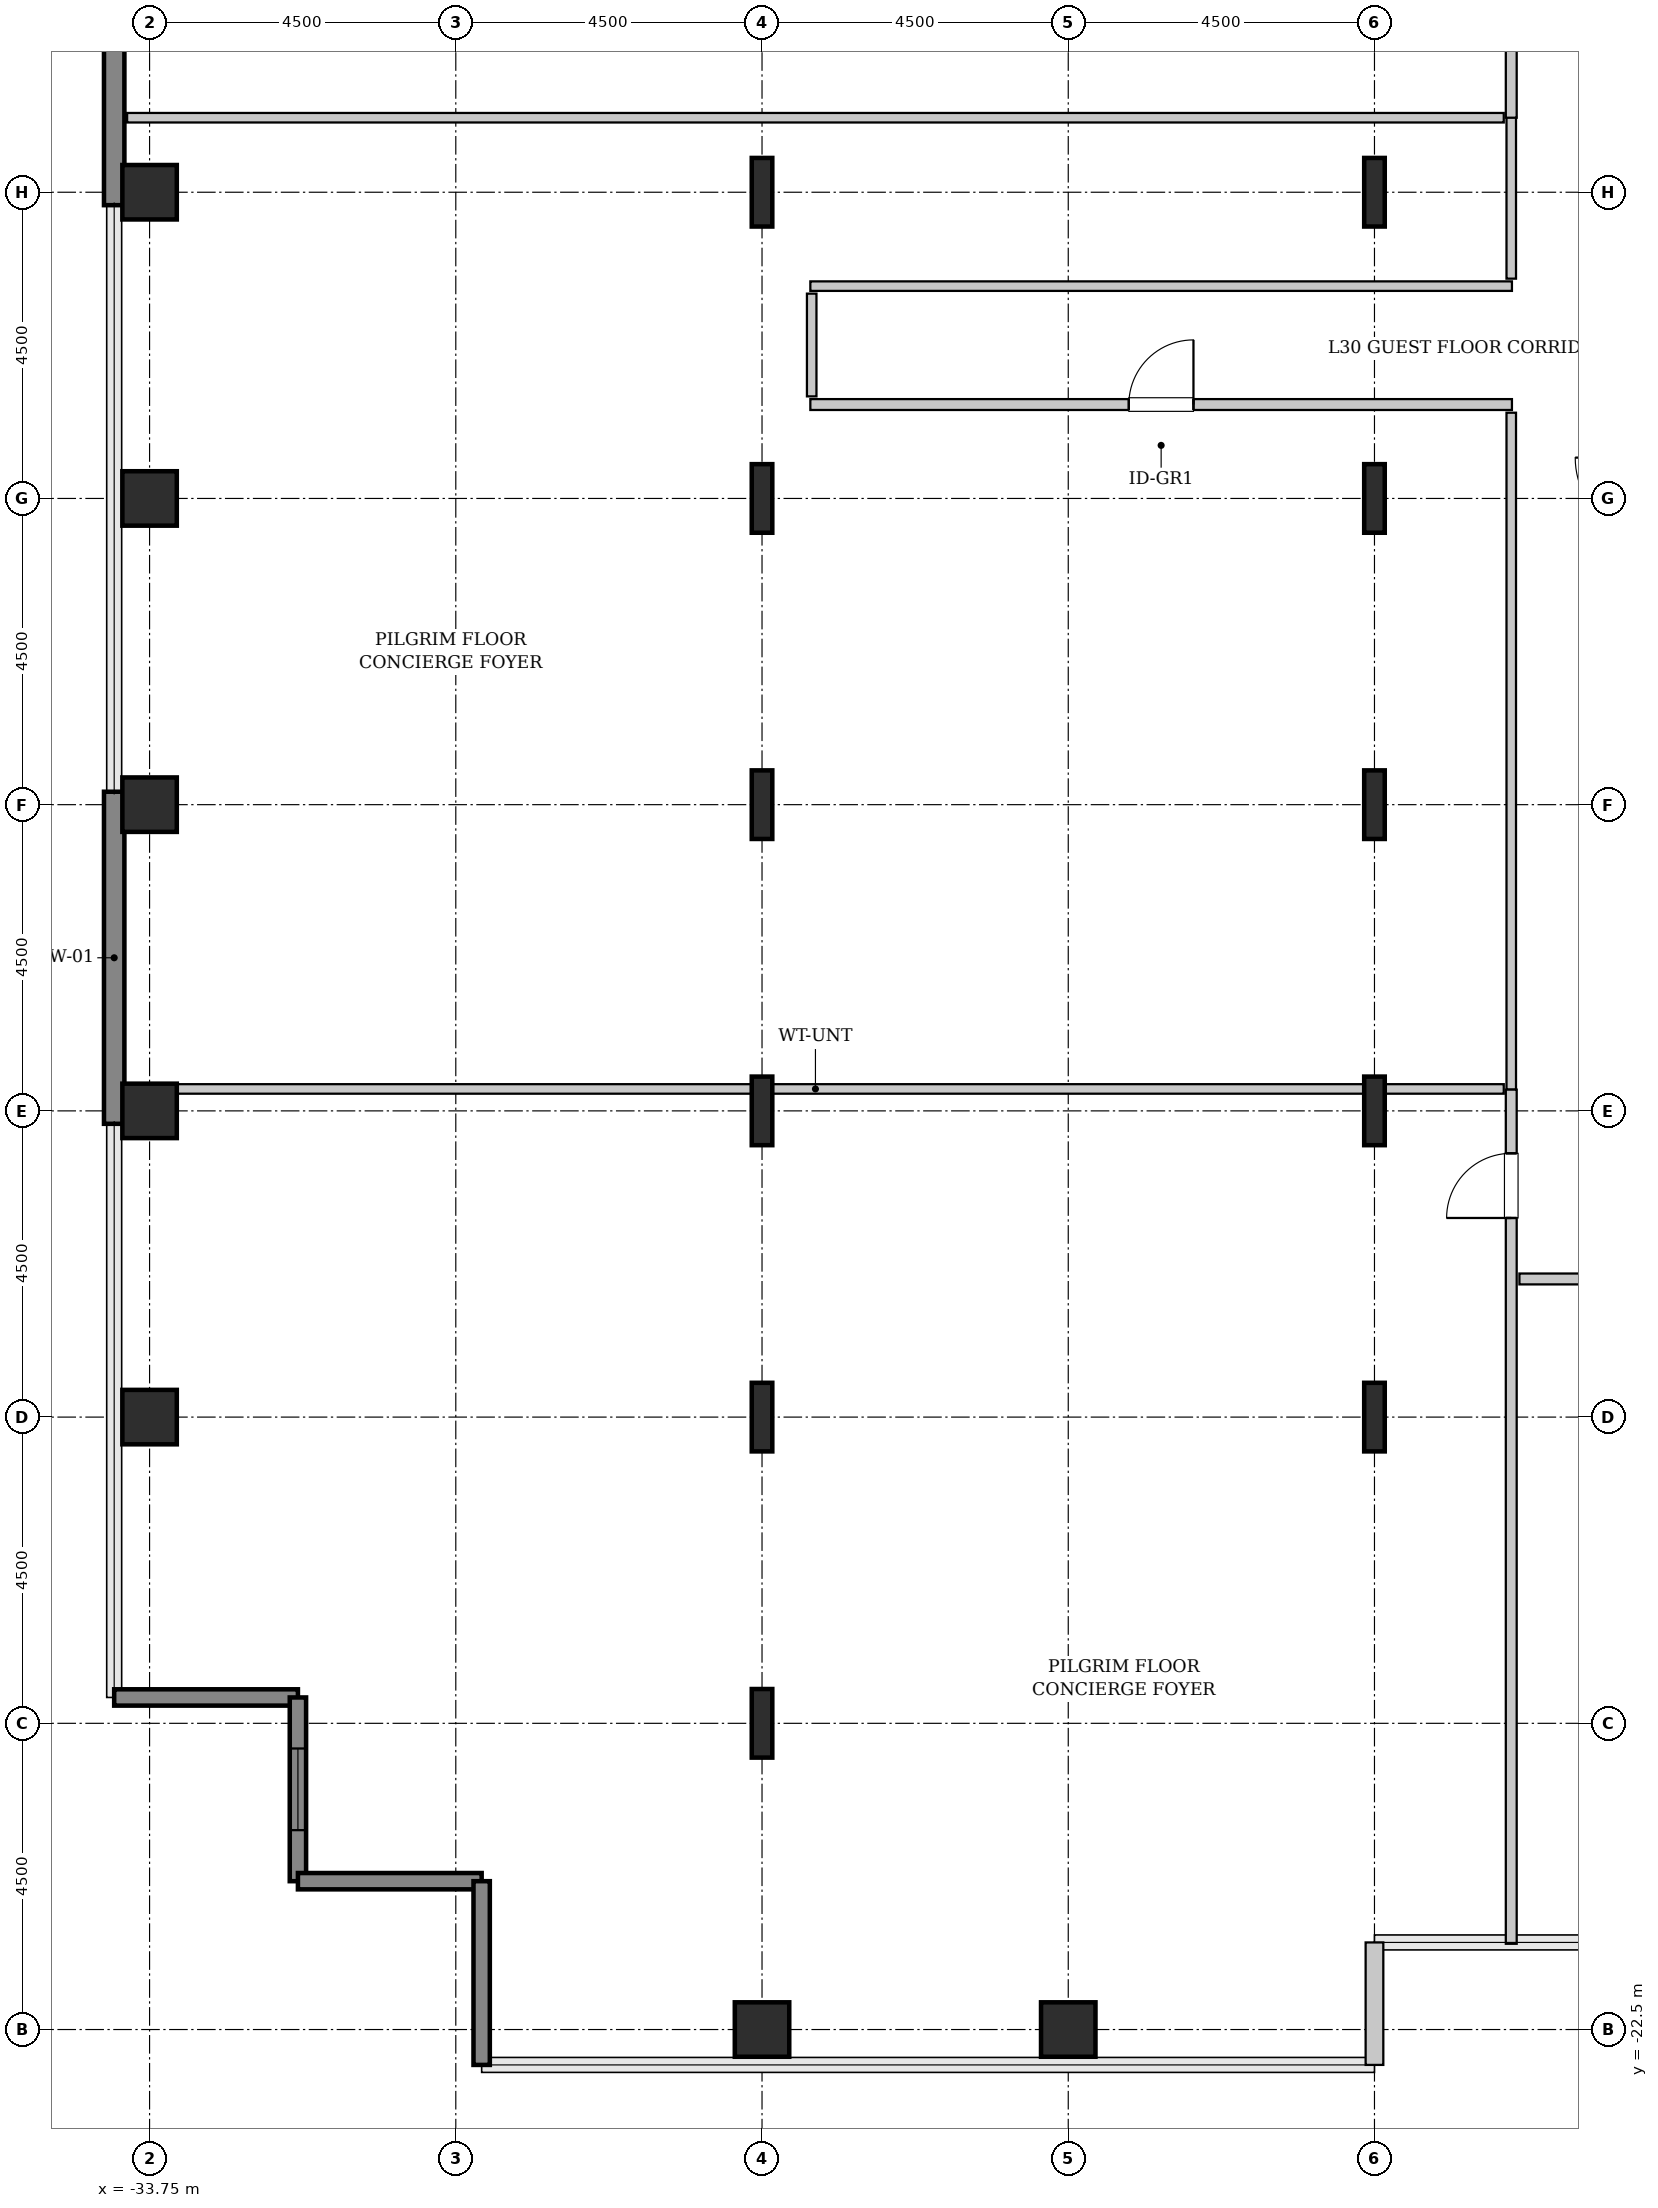
"""IFC4 building model, lengths in metres.
Left out: names, types, materials, properties, quantities, classifications, styles, units other than length and angle.
Written with IfcOpenShell. Run it as: python <this file> out.ifc"""

import sys

from ifc_helpers import new_model, si_unit, direction, frame, frame_2d, origin, origin_2d, place, context, subcontext, project, spatial, rectangle, hollow_rectangle, i_section, extrude, source, transform, mapped, element, fill, save


model = new_model("IFC4")
c1 = context("Model", 3, precision=1e-05, world=origin(), true_north=direction((0.0, 1.0)))
c2 = subcontext(c1, "Body", "Model", "MODEL_VIEW")
j1 = project(units=[si_unit("LENGTHUNIT", "METRE"), si_unit("PLANEANGLEUNIT", "RADIAN")], contexts=[c1])
p1 = place(None, origin())
s1 = spatial("IfcSite", under=j1, at=p1, CompositionType="ELEMENT")
p2 = place(p1, origin())
s2 = spatial("IfcBuilding", under=s1, at=p2, CompositionType="ELEMENT")
p3 = place(p2, frame((0.0, 0.0, 125.0)))
s3 = spatial("IfcBuildingStorey", under=s2, at=p3, CompositionType="ELEMENT", Elevation=125.0)
m1 = source(origin(), c2, "Body", "SweptSolid", [
    extrude(hollow_rectangle(XDim=0.8, YDim=0.8, WallThickness=0.04, InnerFilletRadius=0.04, OuterFilletRadius=0.08, at=origin_2d()), origin(), (0.0, 0.0, 1.0), 3.8),
])
for number, where, z_axis, x_axis in (
    (1, (-33.75, -13.5, 0.0), (0.0, 0.0, 1.0), (1.0, 0.0, 0.0)),
    (2, (-33.75, -9.0, 0.0), (0.0, 0.0, 1.0), (1.0, 0.0, 0.0)),
    (3, (-33.75, -4.5, 0.0), (0.0, 0.0, 1.0), (1.0, 0.0, 0.0)),
    (4, (-33.75, 0.0, 0.0), (0.0, 0.0, 1.0), (1.0, 0.0, 0.0)),
    (5, (-33.75, 4.5, 0.0), (0.0, 0.0, 1.0), (1.0, 0.0, 0.0)),
    (6, (-24.75, -22.5, 0.0), (0.0, 0.0, 1.0), (1.0, 0.0, 0.0)),
):
    element("IfcColumn", number, at=place(p3, frame(where, z_axis=z_axis, x_axis=x_axis)), inside=s3, PredefinedType="COLUMN", context=c2, shape_type="MappedRepresentation", body=[
        mapped(m1, transform((0.0, 0.0, 0.0), x_axis=(1.0, 0.0, 0.0), y_axis=(0.0, 1.0, 0.0), z_axis=(0.0, 0.0, 1.0), scale=1.0)),
    ])
m2 = source(origin(), c2, "Body", "SweptSolid", [
    extrude(i_section(OverallWidth=0.302, OverallDepth=1.008, WebThickness=0.021, FlangeThickness=0.04, FilletRadius=0.03, at=origin_2d()), origin(), (0.0, 0.0, 1.0), 3.8),
])
for number, where, z_axis, x_axis in (
    (7, (-24.75, -18.0, 0.0), (0.0, 0.0, 1.0), (1.0, 0.0, 0.0)),
    (8, (-24.75, -13.5, 0.0), (0.0, 0.0, 1.0), (1.0, 0.0, 0.0)),
    (9, (-24.75, -9.0, 0.0), (0.0, 0.0, 1.0), (1.0, 0.0, 0.0)),
    (10, (-24.75, -4.5, 0.0), (0.0, 0.0, 1.0), (1.0, 0.0, 0.0)),
    (11, (-24.75, 0.0, 0.0), (0.0, 0.0, 1.0), (1.0, 0.0, 0.0)),
    (12, (-24.75, 4.5, 0.0), (0.0, 0.0, 1.0), (1.0, 0.0, 0.0)),
):
    element("IfcColumn", number, at=place(p3, frame(where, z_axis=z_axis, x_axis=x_axis)), inside=s3, PredefinedType="COLUMN", context=c2, shape_type="MappedRepresentation", body=[
        mapped(m2, transform((0.0, 0.0, 0.0), x_axis=(1.0, 0.0, 0.0), y_axis=(0.0, 1.0, 0.0), z_axis=(0.0, 0.0, 1.0), scale=1.0)),
    ])
p4 = place(p3, frame((-20.25, -22.5, 0.0), z_axis=(0.0, 0.0, 1.0), x_axis=(1.0, 0.0, 0.0)))
e13 = element("IfcColumn", 13, at=p4, inside=s3, PredefinedType="COLUMN", context=c2, shape_type="MappedRepresentation", body=[
    mapped(m1, transform((0.0, 0.0, 0.0), x_axis=(1.0, 0.0, 0.0), y_axis=(0.0, 1.0, 0.0), z_axis=(0.0, 0.0, 1.0), scale=1.0)),
])
for number, where, z_axis, x_axis in (
    (14, (-15.75, -13.5, 0.0), (0.0, 0.0, 1.0), (1.0, 0.0, 0.0)),
    (15, (-15.75, -9.0, 0.0), (0.0, 0.0, 1.0), (1.0, 0.0, 0.0)),
    (16, (-15.75, -4.5, 0.0), (0.0, 0.0, 1.0), (1.0, 0.0, 0.0)),
    (17, (-15.75, 0.0, 0.0), (0.0, 0.0, 1.0), (1.0, 0.0, 0.0)),
    (18, (-15.75, 4.5, 0.0), (0.0, 0.0, 1.0), (1.0, 0.0, 0.0)),
):
    element("IfcColumn", number, at=place(p3, frame(where, z_axis=z_axis, x_axis=x_axis)), inside=s3, PredefinedType="COLUMN", context=c2, shape_type="MappedRepresentation", body=[
        mapped(m2, transform((0.0, 0.0, 0.0), x_axis=(1.0, 0.0, 0.0), y_axis=(0.0, 1.0, 0.0), z_axis=(0.0, 0.0, 1.0), scale=1.0)),
    ])
m3 = source(origin(), c2, "Body", "SweptSolid", [
    extrude(rectangle(XDim=4.88, YDim=0.3, at=frame_2d((2.44, 0.0))), origin(), (0.0, 0.0, 1.0), 3.55),
])
for number, where, z_axis, x_axis in (
    (19, (-34.27, -9.19, 0.0), (0.0, 0.0, 1.0), (0.0, 1.0, 0.0)),
    (20, (-34.27, 4.31, 0.0), (0.0, 0.0, 1.0), (0.0, 1.0, 0.0)),
):
    element("IfcWall", number, at=place(p3, frame(where, z_axis=z_axis, x_axis=x_axis)), inside=s3, PredefinedType="SHEAR", context=c2, shape_type="MappedRepresentation", body=[
        mapped(m3, transform((0.0, 0.0, 0.0), x_axis=(1.0, 0.0, 0.0), y_axis=(0.0, 1.0, 0.0), z_axis=(0.0, 0.0, 1.0), scale=1.0)),
    ])
m4 = source(origin(), c2, "Body", "SweptSolid", [
    extrude(rectangle(XDim=2.7, YDim=0.24, at=frame_2d((1.35, 0.0))), origin(), (0.0, 0.0, 1.0), 3.55),
])
p5 = place(p3, frame((-34.27, -17.62, 0.0), z_axis=(0.0, 0.0, 1.0), x_axis=(1.0, 0.0, 0.0)))
e21 = element("IfcWall", 21, at=p5, inside=s3, PredefinedType="SHEAR", context=c2, shape_type="MappedRepresentation", body=[
    mapped(m4, transform((0.0, 0.0, 0.0), x_axis=(1.0, 0.0, 0.0), y_axis=(0.0, 1.0, 0.0), z_axis=(0.0, 0.0, 1.0), scale=1.0)),
])
p6 = place(p3, frame((-31.57, -17.62, 0.0), z_axis=(0.0, 0.0, 1.0), x_axis=(0.0, -1.0, 0.0)))
e22 = element("IfcWall", 22, at=p6, inside=s3, PredefinedType="SHEAR", context=c2, shape_type="MappedRepresentation", body=[
    mapped(m4, transform((0.0, 0.0, 0.0), x_axis=(1.0, 0.0, 0.0), y_axis=(0.0, 1.0, 0.0), z_axis=(0.0, 0.0, 1.0), scale=1.0)),
])
p7 = place(p6, frame((0.75, 0.0, 0.85)))
e23 = element("IfcOpeningElement", 23, at=p7, cuts=e22, PredefinedType="OPENING", context=c2, shape_type="SweptSolid", body=[
    extrude(rectangle(XDim=1.2, YDim=1.8, at=frame_2d((0.6, 0.9))), frame((0.0, 0.13, 0.0), z_axis=(0.0, -1.0, 0.0), x_axis=(1.0, 0.0, 0.0)), (0.0, 0.0, 1.0), 0.26),
])
for number, where, z_axis, x_axis in (
    (24, (-31.57, -20.32, 0.0), (0.0, 0.0, 1.0), (1.0, 0.0, 0.0)),
    (25, (-28.87, -20.32, 0.0), (0.0, 0.0, 1.0), (0.0, -1.0, 0.0)),
):
    element("IfcWall", number, at=place(p3, frame(where, z_axis=z_axis, x_axis=x_axis)), inside=s3, PredefinedType="SHEAR", context=c2, shape_type="MappedRepresentation", body=[
        mapped(m4, transform((0.0, 0.0, 0.0), x_axis=(1.0, 0.0, 0.0), y_axis=(0.0, 1.0, 0.0), z_axis=(0.0, 0.0, 1.0), scale=1.0)),
    ])
m5 = source(origin(), c2, "Body", "SweptSolid", [
    extrude(rectangle(XDim=1.8, YDim=0.26, at=frame_2d((0.9, 0.0))), origin(), (0.0, 0.0, 1.0), 3.55),
])
p8 = place(p3, frame((-15.75, -23.02, 0.0), z_axis=(0.0, 0.0, 1.0), x_axis=(0.0, 1.0, 0.0)))
e26 = element("IfcWall", 26, at=p8, inside=s3, PredefinedType="SOLIDWALL", context=c2, shape_type="MappedRepresentation", body=[
    mapped(m5, transform((0.0, 0.0, 0.0), x_axis=(1.0, 0.0, 0.0), y_axis=(0.0, 1.0, 0.0), z_axis=(0.0, 0.0, 1.0), scale=1.0)),
])
m6 = source(origin(), c2, "Body", "SweptSolid", [
    extrude(rectangle(XDim=10.31, YDim=0.16, at=frame_2d((5.155, 0.0))), origin(), (0.0, 0.0, 1.0), 3.535),
])
p9 = place(p3, frame((-24.04, 1.38, 0.0), z_axis=(0.0, 0.0, 1.0), x_axis=(1.0, 0.0, 0.0)))
e27 = element("IfcWall", 27, at=p9, inside=s3, PredefinedType="PARTITIONING", context=c2, shape_type="MappedRepresentation", body=[
    mapped(m6, transform((0.0, 0.0, 0.0), x_axis=(1.0, 0.0, 0.0), y_axis=(0.0, 1.0, 0.0), z_axis=(0.0, 0.0, 1.0), scale=1.0)),
])
p10 = place(p9, frame((4.68, 0.0, 0.0)))
e28 = element("IfcOpeningElement", 28, at=p10, cuts=e27, PredefinedType="OPENING", context=c2, shape_type="SweptSolid", body=[
    extrude(rectangle(XDim=0.95, YDim=2.1, at=frame_2d((0.475, 1.05))), frame((0.0, 0.09, 0.0), z_axis=(0.0, -1.0, 0.0), x_axis=(1.0, 0.0, 0.0)), (0.0, 0.0, 1.0), 0.18),
])
m7 = source(origin(), c2, "Body", "SweptSolid", [
    extrude(rectangle(XDim=10.31, YDim=0.14, at=frame_2d((5.155, 0.0))), origin(), (0.0, 0.0, 1.0), 3.535),
])
p11 = place(p3, frame((-24.04, 3.12, 0.0), z_axis=(0.0, 0.0, 1.0), x_axis=(1.0, 0.0, 0.0)))
e29 = element("IfcWall", 29, at=p11, inside=s3, PredefinedType="PARTITIONING", context=c2, shape_type="MappedRepresentation", body=[
    mapped(m7, transform((0.0, 0.0, 0.0), x_axis=(1.0, 0.0, 0.0), y_axis=(0.0, 1.0, 0.0), z_axis=(0.0, 0.0, 1.0), scale=1.0)),
])
m8 = source(origin(), c2, "Body", "SweptSolid", [
    extrude(rectangle(XDim=9.948, YDim=0.14, at=frame_2d((4.974, 0.0))), origin(), (0.0, 0.0, 1.0), 3.535),
])
p12 = place(p3, frame((-13.74, -8.688, 0.0), z_axis=(0.0, 0.0, 1.0), x_axis=(0.0, 1.0, 0.0)))
e30 = element("IfcWall", 30, at=p12, inside=s3, PredefinedType="PARTITIONING", context=c2, shape_type="MappedRepresentation", body=[
    mapped(m8, transform((0.0, 0.0, 0.0), x_axis=(1.0, 0.0, 0.0), y_axis=(0.0, 1.0, 0.0), z_axis=(0.0, 0.0, 1.0), scale=1.0)),
])
m9 = source(origin(), c2, "Body", "SweptSolid", [
    extrude(rectangle(XDim=2.375, YDim=0.14, at=frame_2d((1.188, 0.0))), origin(), (0.0, 0.0, 1.0), 3.535),
])
p13 = place(p3, frame((-13.74, 3.23, 0.0), z_axis=(0.0, 0.0, 1.0), x_axis=(0.0, 1.0, 0.0)))
e31 = element("IfcWall", 31, at=p13, inside=s3, PredefinedType="PARTITIONING", context=c2, shape_type="MappedRepresentation", body=[
    mapped(m9, transform((0.0, 0.0, 0.0), x_axis=(1.0, 0.0, 0.0), y_axis=(0.0, 1.0, 0.0), z_axis=(0.0, 0.0, 1.0), scale=1.0)),
])
m10 = source(origin(), c2, "Body", "SweptSolid", [
    extrude(rectangle(XDim=1.51, YDim=0.14, at=frame_2d((0.755, 0.0))), origin(), (0.0, 0.0, 1.0), 3.535),
])
p14 = place(p3, frame((-24.02, 1.5, 0.0), z_axis=(0.0, 0.0, 1.0), x_axis=(0.0, 1.0, 0.0)))
e32 = element("IfcWall", 32, at=p14, inside=s3, PredefinedType="PARTITIONING", context=c2, shape_type="MappedRepresentation", body=[
    mapped(m10, transform((0.0, 0.0, 0.0), x_axis=(1.0, 0.0, 0.0), y_axis=(0.0, 1.0, 0.0), z_axis=(0.0, 0.0, 1.0), scale=1.0)),
])
m11 = source(origin(), c2, "Body", "SweptSolid", [
    extrude(rectangle(XDim=20.23, YDim=0.14, at=frame_2d((10.115, 0.0))), origin(), (0.0, 0.0, 1.0), 2.875),
])
p15 = place(p3, frame((-34.08, -8.677, 0.0), z_axis=(0.0, 0.0, 1.0), x_axis=(1.0, 0.0, 0.0)))
e33 = element("IfcWall", 33, at=p15, inside=s3, PredefinedType="PARTITIONING", context=c2, shape_type="MappedRepresentation", body=[
    mapped(m11, transform((0.0, 0.0, 0.0), x_axis=(1.0, 0.0, 0.0), y_axis=(0.0, 1.0, 0.0), z_axis=(0.0, 0.0, 1.0), scale=1.0)),
])
m12 = source(origin(), c2, "Body", "SweptSolid", [
    extrude(rectangle(XDim=20.23, YDim=0.14, at=frame_2d((10.115, 0.0))), origin(), (0.0, 0.0, 1.0), 3.535),
])
p16 = place(p3, frame((-34.08, 5.595, 0.0), z_axis=(0.0, 0.0, 1.0), x_axis=(1.0, 0.0, 0.0)))
e34 = element("IfcWall", 34, at=p16, inside=s3, PredefinedType="PARTITIONING", context=c2, shape_type="MappedRepresentation", body=[
    mapped(m12, transform((0.0, 0.0, 0.0), x_axis=(1.0, 0.0, 0.0), y_axis=(0.0, 1.0, 0.0), z_axis=(0.0, 0.0, 1.0), scale=1.0)),
])
m13 = source(origin(), c2, "Body", "SweptSolid", [
    extrude(rectangle(XDim=12.552, YDim=0.16, at=frame_2d((6.276, 0.0))), origin(), (0.0, 0.0, 1.0), 3.535),
])
p17 = place(p3, frame((-13.74, -21.24, 0.0), z_axis=(0.0, 0.0, 1.0), x_axis=(0.0, 1.0, 0.0)))
e35 = element("IfcWall", 35, at=p17, inside=s3, PredefinedType="PARTITIONING", context=c2, shape_type="MappedRepresentation", body=[
    mapped(m13, transform((0.0, 0.0, 0.0), x_axis=(1.0, 0.0, 0.0), y_axis=(0.0, 1.0, 0.0), z_axis=(0.0, 0.0, 1.0), scale=1.0)),
])
p18 = place(p17, frame((10.666, 0.0, 0.0)))
e36 = element("IfcOpeningElement", 36, at=p18, cuts=e35, PredefinedType="OPENING", context=c2, shape_type="SweptSolid", body=[
    extrude(rectangle(XDim=0.95, YDim=2.1, at=frame_2d((0.475, 1.05))), frame((0.0, 0.09, 0.0), z_axis=(0.0, -1.0, 0.0), x_axis=(1.0, 0.0, 0.0)), (0.0, 0.0, 1.0), 0.18),
])
m14 = source(origin(), c2, "Body", "SweptSolid", [
    extrude(rectangle(XDim=15.645, YDim=0.16, at=frame_2d((7.823, 0.0))), origin(), (0.0, 0.0, 1.0), 3.535),
])
p19 = place(p3, frame((-13.74, 5.595, 0.0), z_axis=(0.0, 0.0, 1.0), x_axis=(0.0, 1.0, 0.0)))
e37 = element("IfcWall", 37, at=p19, inside=s3, PredefinedType="PARTITIONING", context=c2, shape_type="MappedRepresentation", body=[
    mapped(m14, transform((0.0, 0.0, 0.0), x_axis=(1.0, 0.0, 0.0), y_axis=(0.0, 1.0, 0.0), z_axis=(0.0, 0.0, 1.0), scale=1.0)),
])
p20 = place(p19, frame((2.482, 0.0, 0.0)))
e38 = element("IfcOpeningElement", 38, at=p20, cuts=e37, PredefinedType="OPENING", context=c2, shape_type="SweptSolid", body=[
    extrude(rectangle(XDim=0.95, YDim=2.1, at=frame_2d((0.475, 1.05))), frame((0.0, 0.09, 0.0), z_axis=(0.0, -1.0, 0.0), x_axis=(1.0, 0.0, 0.0)), (0.0, 0.0, 1.0), 0.18),
])
m15 = source(origin(), c2, "Body", "SweptSolid", [
    extrude(rectangle(XDim=6.225, YDim=0.16, at=frame_2d((3.113, 0.0))), origin(), (0.0, 0.0, 1.0), 3.535),
])
p21 = place(p3, frame((-13.62, -11.47, 0.0), z_axis=(0.0, 0.0, 1.0), x_axis=(1.0, 0.0, 0.0)))
e39 = element("IfcWall", 39, at=p21, inside=s3, PredefinedType="PARTITIONING", context=c2, shape_type="MappedRepresentation", body=[
    mapped(m15, transform((0.0, 0.0, 0.0), x_axis=(1.0, 0.0, 0.0), y_axis=(0.0, 1.0, 0.0), z_axis=(0.0, 0.0, 1.0), scale=1.0)),
])
p22 = place(p21, frame((2.637, 0.0, 0.0)))
e40 = element("IfcOpeningElement", 40, at=p22, cuts=e39, PredefinedType="OPENING", context=c2, shape_type="SweptSolid", body=[
    extrude(rectangle(XDim=0.95, YDim=2.1, at=frame_2d((0.475, 1.05))), frame((0.0, 0.09, 0.0), z_axis=(0.0, -1.0, 0.0), x_axis=(1.0, 0.0, 0.0)), (0.0, 0.0, 1.0), 0.18),
])
m16 = source(origin(), c2, "Body", "SweptSolid", [
    extrude(rectangle(XDim=1.2, YDim=1.8, at=frame_2d((0.6, 0.9))), frame((0.0, 0.03, 0.0), z_axis=(0.0, -1.0, 0.0), x_axis=(1.0, 0.0, 0.0)), (0.0, 0.0, 1.0), 0.06),
])
p23 = place(p7, origin())
e41 = element("IfcWindow", 41, at=p23, inside=s3, PartitioningType="SINGLE_PANEL", PredefinedType="WINDOW", context=c2, shape_type="MappedRepresentation", body=[
    mapped(m16, transform((0.0, 0.0, 0.0), x_axis=(1.0, 0.0, 0.0), y_axis=(0.0, 1.0, 0.0), z_axis=(0.0, 0.0, 1.0), scale=1.0)),
])
fill(e23, e41)
m17 = source(origin(), c2, "Body", "SweptSolid", [
    extrude(rectangle(XDim=0.95, YDim=2.1, at=frame_2d((0.475, 1.05))), frame((0.0, 0.025, 0.0), z_axis=(0.0, -1.0, 0.0), x_axis=(1.0, 0.0, 0.0)), (0.0, 0.0, 1.0), 0.05),
])
p24 = place(p10, origin())
e42 = element("IfcDoor", 42, at=p24, inside=s3, OperationType="SINGLE_SWING_RIGHT", PredefinedType="DOOR", context=c2, shape_type="MappedRepresentation", body=[
    mapped(m17, transform((0.0, 0.0, 0.0), x_axis=(1.0, 0.0, 0.0), y_axis=(0.0, 1.0, 0.0), z_axis=(0.0, 0.0, 1.0), scale=1.0)),
])
fill(e28, e42)
p25 = place(p18, origin())
e43 = element("IfcDoor", 43, at=p25, inside=s3, OperationType="SINGLE_SWING_LEFT", PredefinedType="DOOR", context=c2, shape_type="MappedRepresentation", body=[
    mapped(m17, transform((0.0, 0.0, 0.0), x_axis=(1.0, 0.0, 0.0), y_axis=(0.0, 1.0, 0.0), z_axis=(0.0, 0.0, 1.0), scale=1.0)),
])
fill(e36, e43)
save(model, sys.argv[1])
